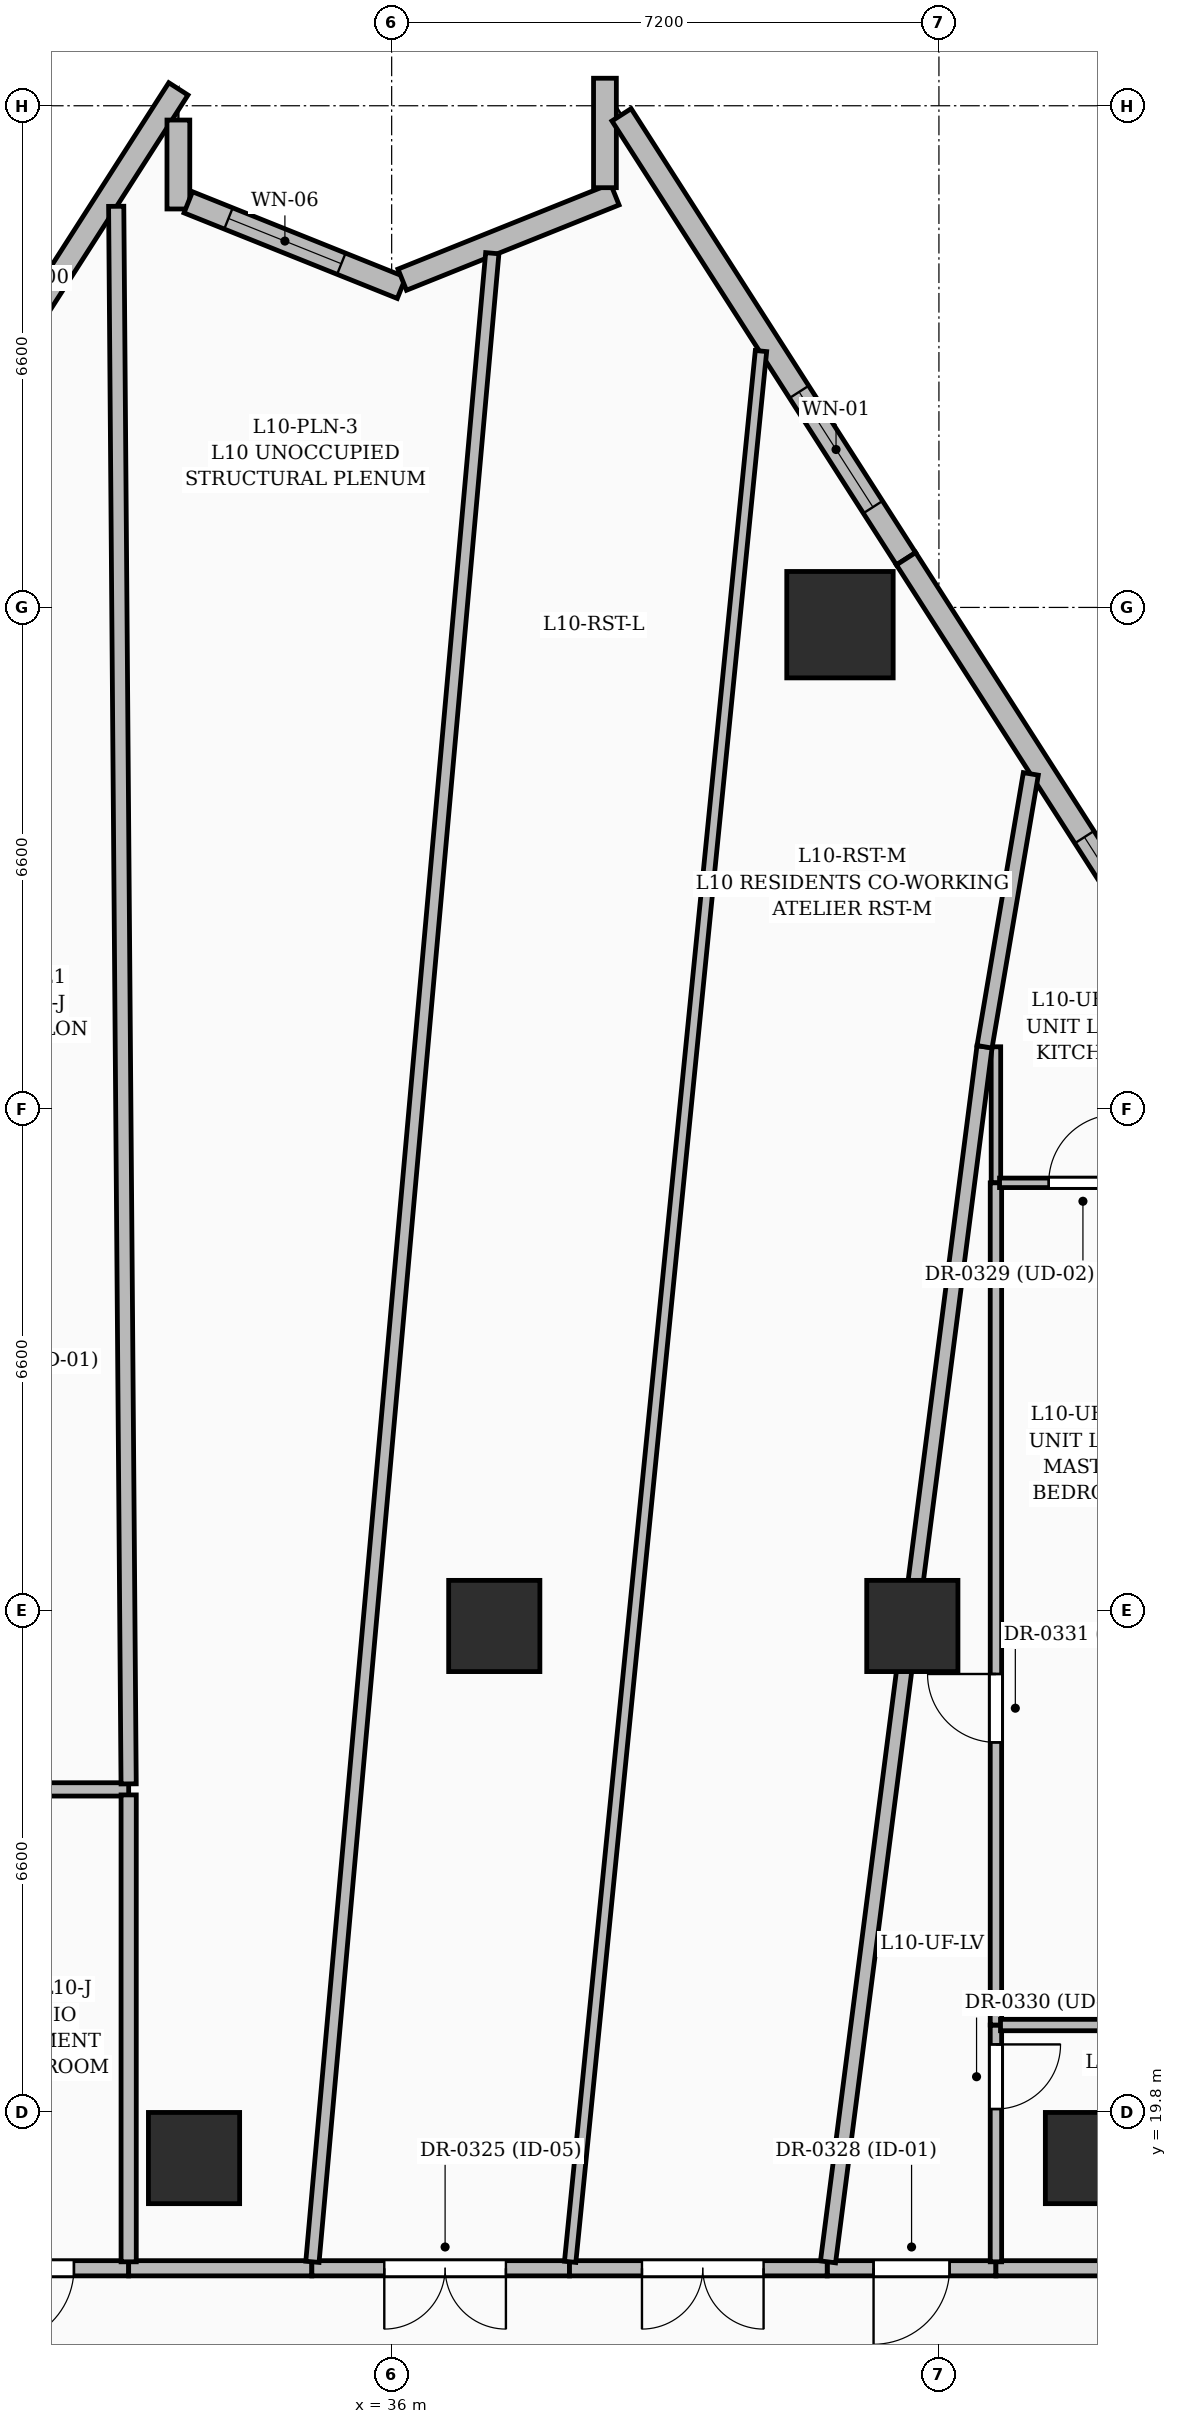
"""IFC4 building model, lengths in metres.
Left out: names, types, materials, properties, quantities, classifications, styles, units other than length and angle.
Written with IfcOpenShell. Run it as: python <this file> out.ifc"""

import sys

from ifc_helpers import new_model, si_unit, direction, frame, frame_2d, origin, origin_2d, place, context, subcontext, project, spatial, rectangle, extrude, element, fill, save


model = new_model("IFC4")
c1 = context("Model", 3, precision=1e-05, world=origin(), true_north=direction((0.0, 1.0)))
c2 = subcontext(c1, "Body", "Model", "MODEL_VIEW")
j1 = project(units=[si_unit("LENGTHUNIT", "METRE"), si_unit("PLANEANGLEUNIT", "RADIAN")], contexts=[c1])
p1 = place(None, origin())
s1 = spatial("IfcSite", under=j1, at=p1, CompositionType="ELEMENT")
p2 = place(p1, origin())
s2 = spatial("IfcBuilding", under=s1, at=p2, CompositionType="ELEMENT")
p3 = place(p2, frame((0.0, 0.0, 46.2)))
s3 = spatial("IfcBuildingStorey", under=s2, at=p3, CompositionType="ELEMENT", Elevation=46.2)
for number, where, z_axis, x_axis in (
    (1, (45.2, 19.2, 0.0), (0.0, 0.0, 1.0), (1.0, 0.0, 0.0)),
    (2, (42.85, 26.2, 0.0), (0.0, 0.0, 1.0), (1.0, 0.0, 0.0)),
    (3, (37.35, 26.2, 0.0), (0.0, 0.0, 1.0), (1.0, 0.0, 0.0)),
    (4, (33.4, 19.2, 0.0), (0.0, 0.0, 1.0), (1.0, 0.0, 0.0)),
):
    element("IfcColumn", number, at=place(p3, frame(where, z_axis=z_axis, x_axis=x_axis)), inside=s3, PredefinedType="COLUMN", context=c2, shape_type="SweptSolid", body=[
        extrude(rectangle(XDim=1.2, YDim=1.2, at=origin_2d()), origin(), (0.0, 0.0, 1.0), 3.6),
    ])
p4 = place(p3, frame((41.898, 39.373, 0.0), z_axis=(0.0, 0.0, 1.0), x_axis=(1.0, 0.0, 0.0)))
e5 = element("IfcColumn", 5, at=p4, inside=s3, PredefinedType="COLUMN", context=c2, shape_type="SweptSolid", body=[
    extrude(rectangle(XDim=1.4, YDim=1.4, at=origin_2d()), origin(), (0.0, 0.0, 1.0), 3.6),
])
p5 = place(p3, frame((29.323, 40.381, 0.0), z_axis=(0.0, 0.0, 1.0), x_axis=(0.539549864139, 0.841953647244, 0.0)))
e6 = element("IfcWall", 6, at=p5, inside=s3, PredefinedType="SOLIDWALL", context=c2, shape_type="SweptSolid", body=[
    extrude(rectangle(XDim=7.176, YDim=0.3, at=frame_2d((3.588, 0.0))), origin(), (0.0, 0.0, 1.0), 3.35),
])
p6 = place(p5, frame((1.6, 0.0, 0.55)))
e7 = element("IfcOpeningElement", 7, at=p6, cuts=e6, PredefinedType="OPENING", context=c2, shape_type="SweptSolid", body=[
    extrude(rectangle(XDim=2.1, YDim=2.4, at=frame_2d((1.05, 1.2))), frame((0.0, 0.16, 0.0), z_axis=(0.0, -1.0, 0.0), x_axis=(1.0, 0.0, 0.0)), (0.0, 0.0, 1.0), 0.32),
])
p7 = place(p3, frame((33.194, 46.012, 0.0), z_axis=(0.0, 0.0, 1.0), x_axis=(0.0, -1.0, 0.0)))
e8 = element("IfcWall", 8, at=p7, inside=s3, PredefinedType="SOLIDWALL", context=c2, shape_type="SweptSolid", body=[
    extrude(rectangle(XDim=1.17, YDim=0.3, at=frame_2d((0.585, 0.0))), origin(), (0.0, 0.0, 1.0), 3.35),
])
p8 = place(p3, frame((33.324, 44.93, 0.0), z_axis=(0.0, 0.0, 1.0), x_axis=(0.928091921944, -0.372351157407, 0.0)))
e9 = element("IfcWall", 9, at=p8, inside=s3, PredefinedType="SOLIDWALL", context=c2, shape_type="SweptSolid", body=[
    extrude(rectangle(XDim=3.023, YDim=0.3, at=frame_2d((1.512, 0.0))), origin(), (0.0, 0.0, 1.0), 3.35),
])
p9 = place(p8, frame((0.57, 0.0, 0.55)))
e10 = element("IfcOpeningElement", 10, at=p9, cuts=e9, PredefinedType="OPENING", context=c2, shape_type="SweptSolid", body=[
    extrude(rectangle(XDim=1.6, YDim=2.2, at=frame_2d((0.8, 1.1))), frame((0.0, 0.16, 0.0), z_axis=(0.0, -1.0, 0.0), x_axis=(1.0, 0.0, 0.0)), (0.0, 0.0, 1.0), 0.32),
])
p10 = place(p3, frame((36.139, 43.912, 0.0), z_axis=(0.0, 0.0, 1.0), x_axis=(0.928057043086, 0.372438081804, 0.0)))
e11 = element("IfcWall", 11, at=p10, inside=s3, PredefinedType="SOLIDWALL", context=c2, shape_type="SweptSolid", body=[
    extrude(rectangle(XDim=3.013, YDim=0.3, at=frame_2d((1.507, 0.0))), origin(), (0.0, 0.0, 1.0), 3.35),
])
p11 = place(p3, frame((38.806, 45.122, 0.0), z_axis=(0.0, 0.0, 1.0), x_axis=(0.0, 1.0, 0.0)))
e12 = element("IfcWall", 12, at=p11, inside=s3, PredefinedType="SOLIDWALL", context=c2, shape_type="SweptSolid", body=[
    extrude(rectangle(XDim=1.44, YDim=0.3, at=frame_2d((0.72, 0.0))), origin(), (0.0, 0.0, 1.0), 3.35),
])
p12 = place(p3, frame((39.024, 46.081, 0.0), z_axis=(0.0, 0.0, 1.0), x_axis=(0.53955097723, -0.84195293394, 0.0)))
e13 = element("IfcWall", 13, at=p12, inside=s3, PredefinedType="SOLIDWALL", context=c2, shape_type="SweptSolid", body=[
    extrude(rectangle(XDim=6.937, YDim=0.3, at=frame_2d((3.468, 0.0))), origin(), (0.0, 0.0, 1.0), 3.35),
])
p13 = place(p12, frame((4.33, 0.0, 0.6)))
e14 = element("IfcOpeningElement", 14, at=p13, cuts=e13, PredefinedType="OPENING", context=c2, shape_type="SweptSolid", body=[
    extrude(rectangle(XDim=1.8, YDim=2.1, at=frame_2d((0.9, 1.05))), frame((0.0, 0.16, 0.0), z_axis=(0.0, -1.0, 0.0), x_axis=(1.0, 0.0, 0.0)), (0.0, 0.0, 1.0), 0.32),
])
p14 = place(p3, frame((42.767, 40.241, 0.0), z_axis=(0.0, 0.0, 1.0), x_axis=(0.539510136354, -0.841979104712, 0.0)))
e15 = element("IfcWall", 15, at=p14, inside=s3, PredefinedType="SOLIDWALL", context=c2, shape_type="SweptSolid", body=[
    extrude(rectangle(XDim=7.481, YDim=0.3, at=frame_2d((3.741, 0.0))), origin(), (0.0, 0.0, 1.0), 3.35),
])
p15 = place(p14, frame((4.35, 0.0, 0.55)))
e16 = element("IfcOpeningElement", 16, at=p15, cuts=e15, PredefinedType="OPENING", context=c2, shape_type="SweptSolid", body=[
    extrude(rectangle(XDim=2.1, YDim=2.4, at=frame_2d((1.05, 1.2))), frame((0.0, 0.16, 0.0), z_axis=(0.0, -1.0, 0.0), x_axis=(1.0, 0.0, 0.0)), (0.0, 0.0, 1.0), 0.32),
])
p16 = place(p3, frame((43.95, 17.75, 0.0), z_axis=(0.0, 0.0, 1.0), x_axis=(-1.0, 0.0, 0.0)))
e17 = element("IfcWall", 17, at=p16, inside=s3, PredefinedType="PARTITIONING", context=c2, shape_type="SweptSolid", body=[
    extrude(rectangle(XDim=2.22, YDim=0.2, at=frame_2d((1.11, 0.0))), origin(), (0.0, 0.0, 1.0), 3.35),
])
p17 = place(p16, frame((0.61, 0.0, 0.0)))
e18 = element("IfcOpeningElement", 18, at=p17, cuts=e17, PredefinedType="OPENING", context=c2, shape_type="SweptSolid", body=[
    extrude(rectangle(XDim=1.0, YDim=2.2, at=frame_2d((0.5, 1.1))), frame((0.0, 0.11, 0.0), z_axis=(0.0, -1.0, 0.0), x_axis=(1.0, 0.0, 0.0)), (0.0, 0.0, 1.0), 0.22),
])
p18 = place(p3, frame((46.35, 17.75, 0.0), z_axis=(0.0, 0.0, 1.0), x_axis=(-1.0, 0.0, 0.0)))
e19 = element("IfcWall", 19, at=p18, inside=s3, PredefinedType="PARTITIONING", context=c2, shape_type="SweptSolid", body=[
    extrude(rectangle(XDim=2.4, YDim=0.2, at=frame_2d((1.2, 0.0))), origin(), (0.0, 0.0, 1.0), 2.309),
])
p19 = place(p3, frame((32.54, 17.75, 0.0), z_axis=(0.0, 0.0, 1.0), x_axis=(-1.0, 0.0, 0.0)))
e20 = element("IfcWall", 20, at=p19, inside=s3, PredefinedType="PARTITIONING", context=c2, shape_type="SweptSolid", body=[
    extrude(rectangle(XDim=2.44, YDim=0.2, at=frame_2d((1.22, 0.0))), origin(), (0.0, 0.0, 1.0), 3.35),
])
p20 = place(p19, frame((0.72, 0.0, 0.0)))
e21 = element("IfcOpeningElement", 21, at=p20, cuts=e20, PredefinedType="OPENING", context=c2, shape_type="SweptSolid", body=[
    extrude(rectangle(XDim=1.0, YDim=2.2, at=frame_2d((0.5, 1.1))), frame((0.0, 0.11, 0.0), z_axis=(0.0, -1.0, 0.0), x_axis=(1.0, 0.0, 0.0)), (0.0, 0.0, 1.0), 0.22),
])
p21 = place(p3, frame((34.95, 17.75, 0.0), z_axis=(0.0, 0.0, 1.0), x_axis=(-1.0, 0.0, 0.0)))
e22 = element("IfcWall", 22, at=p21, inside=s3, PredefinedType="PARTITIONING", context=c2, shape_type="SweptSolid", body=[
    extrude(rectangle(XDim=2.41, YDim=0.2, at=frame_2d((1.205, 0.0))), origin(), (0.0, 0.0, 1.0), 2.309),
])
p22 = place(p3, frame((38.34, 17.75, 0.0), z_axis=(0.0, 0.0, 1.0), x_axis=(-1.0, 0.0, 0.0)))
e23 = element("IfcWall", 23, at=p22, inside=s3, PredefinedType="PARTITIONING", context=c2, shape_type="SweptSolid", body=[
    extrude(rectangle(XDim=3.39, YDim=0.2, at=frame_2d((1.695, 0.0))), origin(), (0.0, 0.0, 1.0), 3.35),
])
p23 = place(p22, frame((0.837, 0.0, 0.0)))
e24 = element("IfcOpeningElement", 24, at=p23, cuts=e23, PredefinedType="OPENING", context=c2, shape_type="SweptSolid", body=[
    extrude(rectangle(XDim=1.6, YDim=2.3, at=frame_2d((0.8, 1.15))), frame((0.0, 0.11, 0.0), z_axis=(0.0, -1.0, 0.0), x_axis=(1.0, 0.0, 0.0)), (0.0, 0.0, 1.0), 0.22),
])
p24 = place(p3, frame((41.73, 17.75, 0.0), z_axis=(0.0, 0.0, 1.0), x_axis=(-1.0, 0.0, 0.0)))
e25 = element("IfcWall", 25, at=p24, inside=s3, PredefinedType="PARTITIONING", context=c2, shape_type="SweptSolid", body=[
    extrude(rectangle(XDim=3.39, YDim=0.2, at=frame_2d((1.695, 0.0))), origin(), (0.0, 0.0, 1.0), 3.35),
])
p25 = place(p24, frame((0.837, 0.0, 0.0)))
e26 = element("IfcOpeningElement", 26, at=p25, cuts=e25, PredefinedType="OPENING", context=c2, shape_type="SweptSolid", body=[
    extrude(rectangle(XDim=1.6, YDim=2.3, at=frame_2d((0.8, 1.15))), frame((0.0, 0.11, 0.0), z_axis=(0.0, -1.0, 0.0), x_axis=(1.0, 0.0, 0.0)), (0.0, 0.0, 1.0), 0.22),
])
p26 = place(p3, frame((43.95, 20.95, 0.0), z_axis=(0.0, 0.0, 1.0), x_axis=(0.0, -1.0, 0.0)))
e27 = element("IfcWall", 27, at=p26, inside=s3, PredefinedType="PARTITIONING", context=c2, shape_type="SweptSolid", body=[
    extrude(rectangle(XDim=3.115, YDim=0.15, at=frame_2d((1.558, 0.0))), origin(), (0.0, 0.0, 1.0), 3.35),
])
p27 = place(p26, frame((0.255, 0.0, 0.0)))
e28 = element("IfcOpeningElement", 28, at=p27, cuts=e27, PredefinedType="OPENING", context=c2, shape_type="SweptSolid", body=[
    extrude(rectangle(XDim=0.85, YDim=2.1, at=frame_2d((0.425, 1.05))), frame((0.0, 0.085, 0.0), z_axis=(0.0, -1.0, 0.0), x_axis=(1.0, 0.0, 0.0)), (0.0, 0.0, 1.0), 0.17),
])
p28 = place(p3, frame((43.95, 32.03, 0.0), z_axis=(0.0, 0.0, 1.0), x_axis=(0.0, 1.0, 0.0)))
e29 = element("IfcWall", 29, at=p28, inside=s3, PredefinedType="PARTITIONING", context=c2, shape_type="SweptSolid", body=[
    extrude(rectangle(XDim=1.79, YDim=0.125, at=frame_2d((0.895, 0.0))), origin(), (0.0, 0.0, 1.0), 2.86),
])
p29 = place(p3, frame((43.95, 20.95, 0.0), z_axis=(0.0, 0.0, 1.0), x_axis=(0.0, 1.0, 0.0)))
e30 = element("IfcWall", 30, at=p29, inside=s3, PredefinedType="PARTITIONING", context=c2, shape_type="SweptSolid", body=[
    extrude(rectangle(XDim=11.08, YDim=0.15, at=frame_2d((5.54, 0.0))), origin(), (0.0, 0.0, 1.0), 2.309),
])
p30 = place(p29, frame((3.718, 0.0, 0.0)))
e31 = element("IfcOpeningElement", 31, at=p30, cuts=e30, PredefinedType="OPENING", context=c2, shape_type="SweptSolid", body=[
    extrude(rectangle(XDim=0.9, YDim=2.15, at=frame_2d((0.45, 1.075))), frame((0.0, 0.085, 0.0), z_axis=(0.0, -1.0, 0.0), x_axis=(1.0, 0.0, 0.0)), (0.0, 0.0, 1.0), 0.17),
])
p31 = place(p3, frame((43.8, 33.82, 0.0), z_axis=(0.0, 0.0, 1.0), x_axis=(-0.127751212179, -0.991806245084, 0.0)))
e32 = element("IfcWall", 32, at=p31, inside=s3, PredefinedType="PARTITIONING", context=c2, shape_type="SweptSolid", body=[
    extrude(rectangle(XDim=16.118, YDim=0.2, at=frame_2d((8.059, 0.0))), origin(), (0.0, 0.0, 1.0), 2.279),
])
p32 = place(p3, frame((46.35, 20.95, 0.0), z_axis=(0.0, 0.0, 1.0), x_axis=(-1.0, 0.0, 0.0)))
e33 = element("IfcWall", 33, at=p32, inside=s3, PredefinedType="PARTITIONING", context=c2, shape_type="SweptSolid", body=[
    extrude(rectangle(XDim=2.34, YDim=0.15, at=frame_2d((1.17, 0.0))), origin(), (0.0, 0.0, 1.0), 2.279),
])
p33 = place(p3, frame((43.998, 32.03, 0.0), z_axis=(0.0, 0.0, 1.0), x_axis=(1.0, 0.0, 0.0)))
e34 = element("IfcWall", 34, at=p33, inside=s3, PredefinedType="PARTITIONING", context=c2, shape_type="SweptSolid", body=[
    extrude(rectangle(XDim=2.353, YDim=0.125, at=frame_2d((1.176, 0.0))), origin(), (0.0, 0.0, 1.0), 2.37),
])
p34 = place(p33, frame((0.647, 0.0, 0.0)))
e35 = element("IfcOpeningElement", 35, at=p34, cuts=e34, PredefinedType="OPENING", context=c2, shape_type="SweptSolid", body=[
    extrude(rectangle(XDim=0.9, YDim=2.15, at=frame_2d((0.45, 1.075))), frame((0.0, 0.072, 0.0), z_axis=(0.0, -1.0, 0.0), x_axis=(1.0, 0.0, 0.0)), (0.0, 0.0, 1.0), 0.145),
])
p35 = place(p3, frame((44.409, 37.41, 0.0), z_axis=(0.0, 0.0, 1.0), x_axis=(-0.167225329542, -0.985918703119, 0.0)))
e36 = element("IfcWall", 36, at=p35, inside=s3, PredefinedType="PARTITIONING", context=c2, shape_type="SweptSolid", body=[
    extrude(rectangle(XDim=3.641, YDim=0.2, at=frame_2d((1.821, 0.0))), origin(), (0.0, 0.0, 1.0), 2.37),
])
p36 = place(p3, frame((32.54, 24.05, 0.0), z_axis=(0.0, 0.0, 1.0), x_axis=(-1.0, 0.0, 0.0)))
e37 = element("IfcWall", 37, at=p36, inside=s3, PredefinedType="PARTITIONING", context=c2, shape_type="SweptSolid", body=[
    extrude(rectangle(XDim=2.393, YDim=0.175, at=frame_2d((1.196, 0.0))), origin(), (0.0, 0.0, 1.0), 2.86),
])
p37 = place(p3, frame((32.54, 17.835, 0.0), z_axis=(0.0, 0.0, 1.0), x_axis=(0.0, 1.0, 0.0)))
e38 = element("IfcWall", 38, at=p37, inside=s3, PredefinedType="PARTITIONING", context=c2, shape_type="SweptSolid", body=[
    extrude(rectangle(XDim=6.143, YDim=0.2, at=frame_2d((3.071, 0.0))), origin(), (0.0, 0.0, 1.0), 2.279),
])
p38 = place(p3, frame((32.54, 24.123, 0.0), z_axis=(0.0, 0.0, 1.0), x_axis=(-0.007881180941, 0.999968943011, 0.0)))
e39 = element("IfcWall", 39, at=p38, inside=s3, PredefinedType="PARTITIONING", context=c2, shape_type="SweptSolid", body=[
    extrude(rectangle(XDim=20.755, YDim=0.2, at=frame_2d((10.377, 0.0))), origin(), (0.0, 0.0, 1.0), 2.279),
])
p39 = place(p3, frame((34.958, 17.835, 0.0), z_axis=(0.0, 0.0, 1.0), x_axis=(0.089195706305, 0.996014119366, 0.0)))
e40 = element("IfcWall", 40, at=p39, inside=s3, PredefinedType="PARTITIONING", context=c2, shape_type="SweptSolid", body=[
    extrude(rectangle(XDim=26.531, YDim=0.175, at=frame_2d((13.266, 0.0))), origin(), (0.0, 0.0, 1.0), 2.279),
])
p40 = place(p3, frame((38.348, 17.835, 0.0), z_axis=(0.0, 0.0, 1.0), x_axis=(0.099373590791, 0.995050194439, 0.0)))
e41 = element("IfcWall", 41, at=p40, inside=s3, PredefinedType="PARTITIONING", context=c2, shape_type="SweptSolid", body=[
    extrude(rectangle(XDim=25.263, YDim=0.15, at=frame_2d((12.632, 0.0))), origin(), (0.0, 0.0, 1.0), 2.309),
])
p41 = place(p9, origin())
e42 = element("IfcWindow", 42, at=p41, inside=s3, PartitioningType="SINGLE_PANEL", PredefinedType="WINDOW", context=c2, shape_type="SweptSolid", body=[
    extrude(rectangle(XDim=1.6, YDim=2.2, at=frame_2d((0.8, 1.1))), frame((0.0, 0.03, 0.0), z_axis=(0.0, -1.0, 0.0), x_axis=(1.0, 0.0, 0.0)), (0.0, 0.0, 1.0), 0.06),
])
fill(e10, e42)
p42 = place(p13, origin())
e43 = element("IfcWindow", 43, at=p42, inside=s3, PartitioningType="SINGLE_PANEL", PredefinedType="WINDOW", context=c2, shape_type="SweptSolid", body=[
    extrude(rectangle(XDim=1.8, YDim=2.1, at=frame_2d((0.9, 1.05))), frame((0.0, 0.03, 0.0), z_axis=(0.0, -1.0, 0.0), x_axis=(1.0, 0.0, 0.0)), (0.0, 0.0, 1.0), 0.06),
])
fill(e14, e43)
p43 = place(p15, origin())
e44 = element("IfcWindow", 44, at=p43, inside=s3, PartitioningType="SINGLE_PANEL", PredefinedType="WINDOW", context=c2, shape_type="SweptSolid", body=[
    extrude(rectangle(XDim=2.1, YDim=2.4, at=frame_2d((1.05, 1.2))), frame((0.0, 0.03, 0.0), z_axis=(0.0, -1.0, 0.0), x_axis=(1.0, 0.0, 0.0)), (0.0, 0.0, 1.0), 0.06),
])
fill(e16, e44)
p44 = place(p23, origin())
e45 = element("IfcDoor", 45, at=p44, inside=s3, OperationType="DOUBLE_DOOR_SINGLE_SWING", PredefinedType="DOOR", context=c2, shape_type="SweptSolid", body=[
    extrude(rectangle(XDim=1.6, YDim=2.3, at=frame_2d((0.8, 1.15))), frame((0.0, 0.025, 0.0), z_axis=(0.0, -1.0, 0.0), x_axis=(1.0, 0.0, 0.0)), (0.0, 0.0, 1.0), 0.05),
])
fill(e24, e45)
p45 = place(p25, origin())
e46 = element("IfcDoor", 46, at=p45, inside=s3, OperationType="DOUBLE_DOOR_SINGLE_SWING", PredefinedType="DOOR", context=c2, shape_type="SweptSolid", body=[
    extrude(rectangle(XDim=1.6, YDim=2.3, at=frame_2d((0.8, 1.15))), frame((0.0, 0.025, 0.0), z_axis=(0.0, -1.0, 0.0), x_axis=(1.0, 0.0, 0.0)), (0.0, 0.0, 1.0), 0.05),
])
fill(e26, e46)
p46 = place(p17, origin())
e47 = element("IfcDoor", 47, at=p46, inside=s3, OperationType="SINGLE_SWING_RIGHT", PredefinedType="DOOR", context=c2, shape_type="SweptSolid", body=[
    extrude(rectangle(XDim=1.0, YDim=2.2, at=frame_2d((0.5, 1.1))), frame((0.0, 0.025, 0.0), z_axis=(0.0, -1.0, 0.0), x_axis=(1.0, 0.0, 0.0)), (0.0, 0.0, 1.0), 0.05),
])
fill(e18, e47)
p47 = place(p34, origin())
e48 = element("IfcDoor", 48, at=p47, inside=s3, OperationType="SINGLE_SWING_RIGHT", PredefinedType="DOOR", context=c2, shape_type="SweptSolid", body=[
    extrude(rectangle(XDim=0.9, YDim=2.15, at=frame_2d((0.45, 1.075))), frame((0.0, 0.025, 0.0), z_axis=(0.0, -1.0, 0.0), x_axis=(1.0, 0.0, 0.0)), (0.0, 0.0, 1.0), 0.05),
])
fill(e35, e48)
p48 = place(p27, origin())
e49 = element("IfcDoor", 49, at=p48, inside=s3, OperationType="SINGLE_SWING_LEFT", PredefinedType="DOOR", context=c2, shape_type="SweptSolid", body=[
    extrude(rectangle(XDim=0.85, YDim=2.1, at=frame_2d((0.425, 1.05))), frame((0.0, 0.025, 0.0), z_axis=(0.0, -1.0, 0.0), x_axis=(1.0, 0.0, 0.0)), (0.0, 0.0, 1.0), 0.05),
])
fill(e28, e49)
p49 = place(p30, origin())
e50 = element("IfcDoor", 50, at=p49, inside=s3, OperationType="SINGLE_SWING_RIGHT", PredefinedType="DOOR", context=c2, shape_type="SweptSolid", body=[
    extrude(rectangle(XDim=0.9, YDim=2.15, at=frame_2d((0.45, 1.075))), frame((0.0, 0.025, 0.0), z_axis=(0.0, -1.0, 0.0), x_axis=(1.0, 0.0, 0.0)), (0.0, 0.0, 1.0), 0.05),
])
fill(e31, e50)
p50 = place(p20, origin())
e51 = element("IfcDoor", 51, at=p50, inside=s3, OperationType="SINGLE_SWING_RIGHT", PredefinedType="DOOR", context=c2, shape_type="SweptSolid", body=[
    extrude(rectangle(XDim=1.0, YDim=2.2, at=frame_2d((0.5, 1.1))), frame((0.0, 0.025, 0.0), z_axis=(0.0, -1.0, 0.0), x_axis=(1.0, 0.0, 0.0)), (0.0, 0.0, 1.0), 0.05),
])
fill(e21, e51)
save(model, sys.argv[1])
